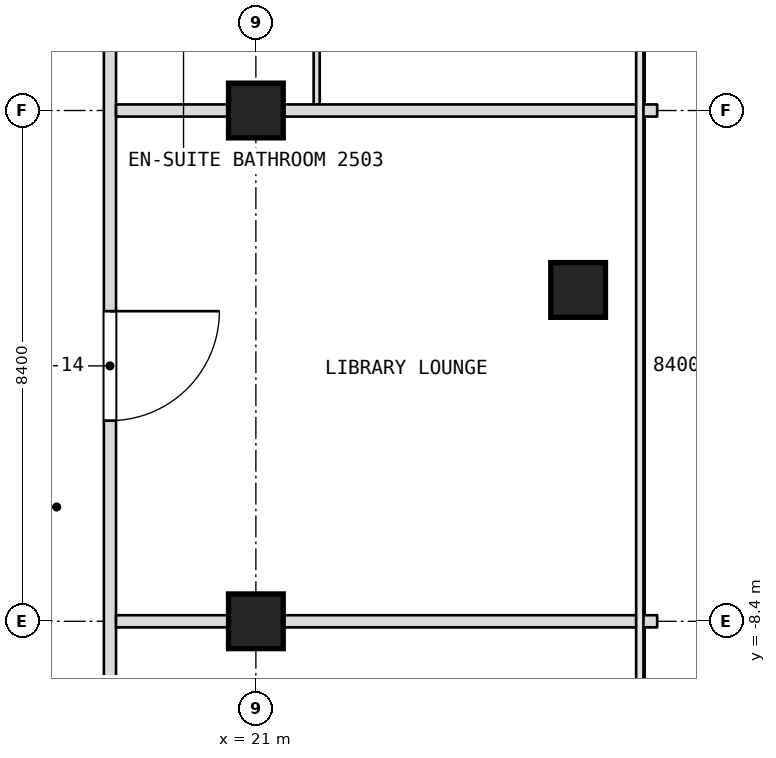
"""IFC4 building model, lengths in metres.
Left out: names, types, materials, properties, quantities, classifications, styles, units other than length and angle.
Written with IfcOpenShell. Run it as: python <this file> out.ifc"""

import sys

from ifc_helpers import new_model, si_unit, direction, frame, frame_2d, origin, origin_2d, place, context, subcontext, project, spatial, rectangle, extrude, element, fill, save


model = new_model("IFC4")
c1 = context("Model", 3, precision=1e-05, world=origin(), true_north=direction((0.0, 1.0)))
c2 = subcontext(c1, "Body", "Model", "MODEL_VIEW")
j1 = project(units=[si_unit("LENGTHUNIT", "METRE"), si_unit("PLANEANGLEUNIT", "RADIAN")], contexts=[c1])
p1 = place(None, origin())
s1 = spatial("IfcSite", under=j1, at=p1, CompositionType="ELEMENT")
p2 = place(p1, origin())
s2 = spatial("IfcBuilding", under=s1, at=p2, CompositionType="ELEMENT")
p3 = place(p2, frame((0.0, 0.0, 115.7)))
s3 = spatial("IfcBuildingStorey", under=s2, at=p3, CompositionType="ELEMENT", Elevation=115.7)
for number, where, z_axis, x_axis in (
    (1, (21.0, -8.4, 0.0), (0.0, 0.0, 1.0), (1.0, 0.0, 0.0)),
    (2, (21.0, 0.0, 0.0), (0.0, 0.0, 1.0), (1.0, 0.0, 0.0)),
    (3, (26.3, -2.951, 0.0), (0.0, 0.0, 1.0), (1.0, 0.0, 0.0)),
):
    element("IfcColumn", number, at=place(p3, frame(where, z_axis=z_axis, x_axis=x_axis)), inside=s3, PredefinedType="COLUMN", context=c2, shape_type="SweptSolid", body=[
        extrude(rectangle(XDim=0.9, YDim=0.9, at=origin_2d()), origin(), (0.0, 0.0, 1.0), 3.6),
    ])
p4 = place(p3, frame((22.0, 0.1, 0.0), z_axis=(0.0, 0.0, 1.0), x_axis=(0.0, 1.0, 0.0)))
e4 = element("IfcWall", 4, at=p4, inside=s3, PredefinedType="PARTITIONING", context=c2, shape_type="SweptSolid", body=[
    extrude(rectangle(XDim=2.35, YDim=0.1, at=frame_2d((1.175, 0.0))), origin(), (0.0, 0.0, 1.0), 3.34),
])
p5 = place(p4, frame((1.3, 0.0, 0.0)))
e5 = element("IfcOpeningElement", 5, at=p5, cuts=e4, PredefinedType="OPENING", context=c2, shape_type="SweptSolid", body=[
    extrude(rectangle(XDim=0.9, YDim=2.1, at=frame_2d((0.45, 1.05))), frame((0.0, 0.05, 0.0), z_axis=(0.0, -1.0, 0.0), x_axis=(1.0, 0.0, 0.0)), (0.0, 0.0, 1.0), 0.1),
])
p6 = place(p3, frame((18.6, -21.708, 0.0), z_axis=(0.0, 0.0, 1.0), x_axis=(0.0, 1.0, 0.0)))
e6 = element("IfcWall", 6, at=p6, inside=s3, PredefinedType="PARTITIONING", context=c2, shape_type="SweptSolid", body=[
    extrude(rectangle(XDim=49.648, YDim=0.2, at=frame_2d((24.824, 0.0))), origin(), (0.0, 0.0, 1.0), 3.34),
])
p7 = place(p6, frame((2.8, 0.0, 0.0)))
e7 = element("IfcOpeningElement", 7, at=p7, cuts=e6, PredefinedType="OPENING", context=c2, shape_type="SweptSolid", body=[
    extrude(rectangle(XDim=1.0, YDim=2.1, at=frame_2d((0.5, 1.05))), frame((0.0, 0.1, 0.0), z_axis=(0.0, -1.0, 0.0), x_axis=(1.0, 0.0, 0.0)), (0.0, 0.0, 1.0), 0.2),
])
p8 = place(p6, frame((10.658, 0.0, 0.0)))
e8 = element("IfcOpeningElement", 8, at=p8, cuts=e6, PredefinedType="OPENING", context=c2, shape_type="SweptSolid", body=[
    extrude(rectangle(XDim=1.1, YDim=2.1, at=frame_2d((0.55, 1.05))), frame((0.0, 0.1, 0.0), z_axis=(0.0, -1.0, 0.0), x_axis=(1.0, 0.0, 0.0)), (0.0, 0.0, 1.0), 0.2),
])
p9 = place(p6, frame((16.608, 0.0, 0.0)))
e9 = element("IfcOpeningElement", 9, at=p9, cuts=e6, PredefinedType="OPENING", context=c2, shape_type="SweptSolid", body=[
    extrude(rectangle(XDim=1.8, YDim=2.1, at=frame_2d((0.9, 1.05))), frame((0.0, 0.1, 0.0), z_axis=(0.0, -1.0, 0.0), x_axis=(1.0, 0.0, 0.0)), (0.0, 0.0, 1.0), 0.2),
])
p10 = place(p6, frame((24.508, 0.0, 0.0)))
e10 = element("IfcOpeningElement", 10, at=p10, cuts=e6, PredefinedType="OPENING", context=c2, shape_type="SweptSolid", body=[
    extrude(rectangle(XDim=1.0, YDim=2.1, at=frame_2d((0.5, 1.05))), frame((0.0, 0.1, 0.0), z_axis=(0.0, -1.0, 0.0), x_axis=(1.0, 0.0, 0.0)), (0.0, 0.0, 1.0), 0.2),
])
p11 = place(p6, frame((26.308, 0.0, 0.0)))
e11 = element("IfcOpeningElement", 11, at=p11, cuts=e6, PredefinedType="OPENING", context=c2, shape_type="SweptSolid", body=[
    extrude(rectangle(XDim=1.0, YDim=2.1, at=frame_2d((0.5, 1.05))), frame((0.0, 0.1, 0.0), z_axis=(0.0, -1.0, 0.0), x_axis=(1.0, 0.0, 0.0)), (0.0, 0.0, 1.0), 0.2),
])
p12 = place(p6, frame((33.708, 0.0, 0.0)))
e12 = element("IfcOpeningElement", 12, at=p12, cuts=e6, PredefinedType="OPENING", context=c2, shape_type="SweptSolid", body=[
    extrude(rectangle(XDim=1.1, YDim=2.1, at=frame_2d((0.55, 1.05))), frame((0.0, 0.1, 0.0), z_axis=(0.0, -1.0, 0.0), x_axis=(1.0, 0.0, 0.0)), (0.0, 0.0, 1.0), 0.2),
])
p13 = place(p6, frame((42.608, 0.0, 0.0)))
e13 = element("IfcOpeningElement", 13, at=p13, cuts=e6, PredefinedType="OPENING", context=c2, shape_type="SweptSolid", body=[
    extrude(rectangle(XDim=1.0, YDim=2.1, at=frame_2d((0.5, 1.05))), frame((0.0, 0.1, 0.0), z_axis=(0.0, -1.0, 0.0), x_axis=(1.0, 0.0, 0.0)), (0.0, 0.0, 1.0), 0.2),
])
p14 = place(p6, frame((44.608, 0.0, 0.0)))
e14 = element("IfcOpeningElement", 14, at=p14, cuts=e6, PredefinedType="OPENING", context=c2, shape_type="SweptSolid", body=[
    extrude(rectangle(XDim=1.0, YDim=2.1, at=frame_2d((0.5, 1.05))), frame((0.0, 0.1, 0.0), z_axis=(0.0, -1.0, 0.0), x_axis=(1.0, 0.0, 0.0)), (0.0, 0.0, 1.0), 0.2),
])
for number, where, z_axis, x_axis in (
    (15, (18.7, -8.4, 0.0), (0.0, 0.0, 1.0), (1.0, 0.0, 0.0)),
    (16, (18.7, 0.0, 0.0), (0.0, 0.0, 1.0), (1.0, 0.0, 0.0)),
):
    element("IfcWall", number, at=place(p3, frame(where, z_axis=z_axis, x_axis=x_axis)), inside=s3, PredefinedType="PARTITIONING", context=c2, shape_type="SweptSolid", body=[
        extrude(rectangle(XDim=8.9, YDim=0.2, at=frame_2d((4.45, 0.0))), origin(), (0.0, 0.0, 1.0), 2.89),
    ])
p15 = place(p9, origin())
e17 = element("IfcDoor", 17, at=p15, inside=s3, OperationType="DOUBLE_DOOR_SINGLE_SWING", PredefinedType="DOOR", context=c2, shape_type="SweptSolid", body=[
    extrude(rectangle(XDim=1.8, YDim=2.1, at=frame_2d((0.9, 1.05))), frame((0.0, 0.025, 0.0), z_axis=(0.0, -1.0, 0.0), x_axis=(1.0, 0.0, 0.0)), (0.0, 0.0, 1.0), 0.05),
])
fill(e9, e17)
save(model, sys.argv[1])
